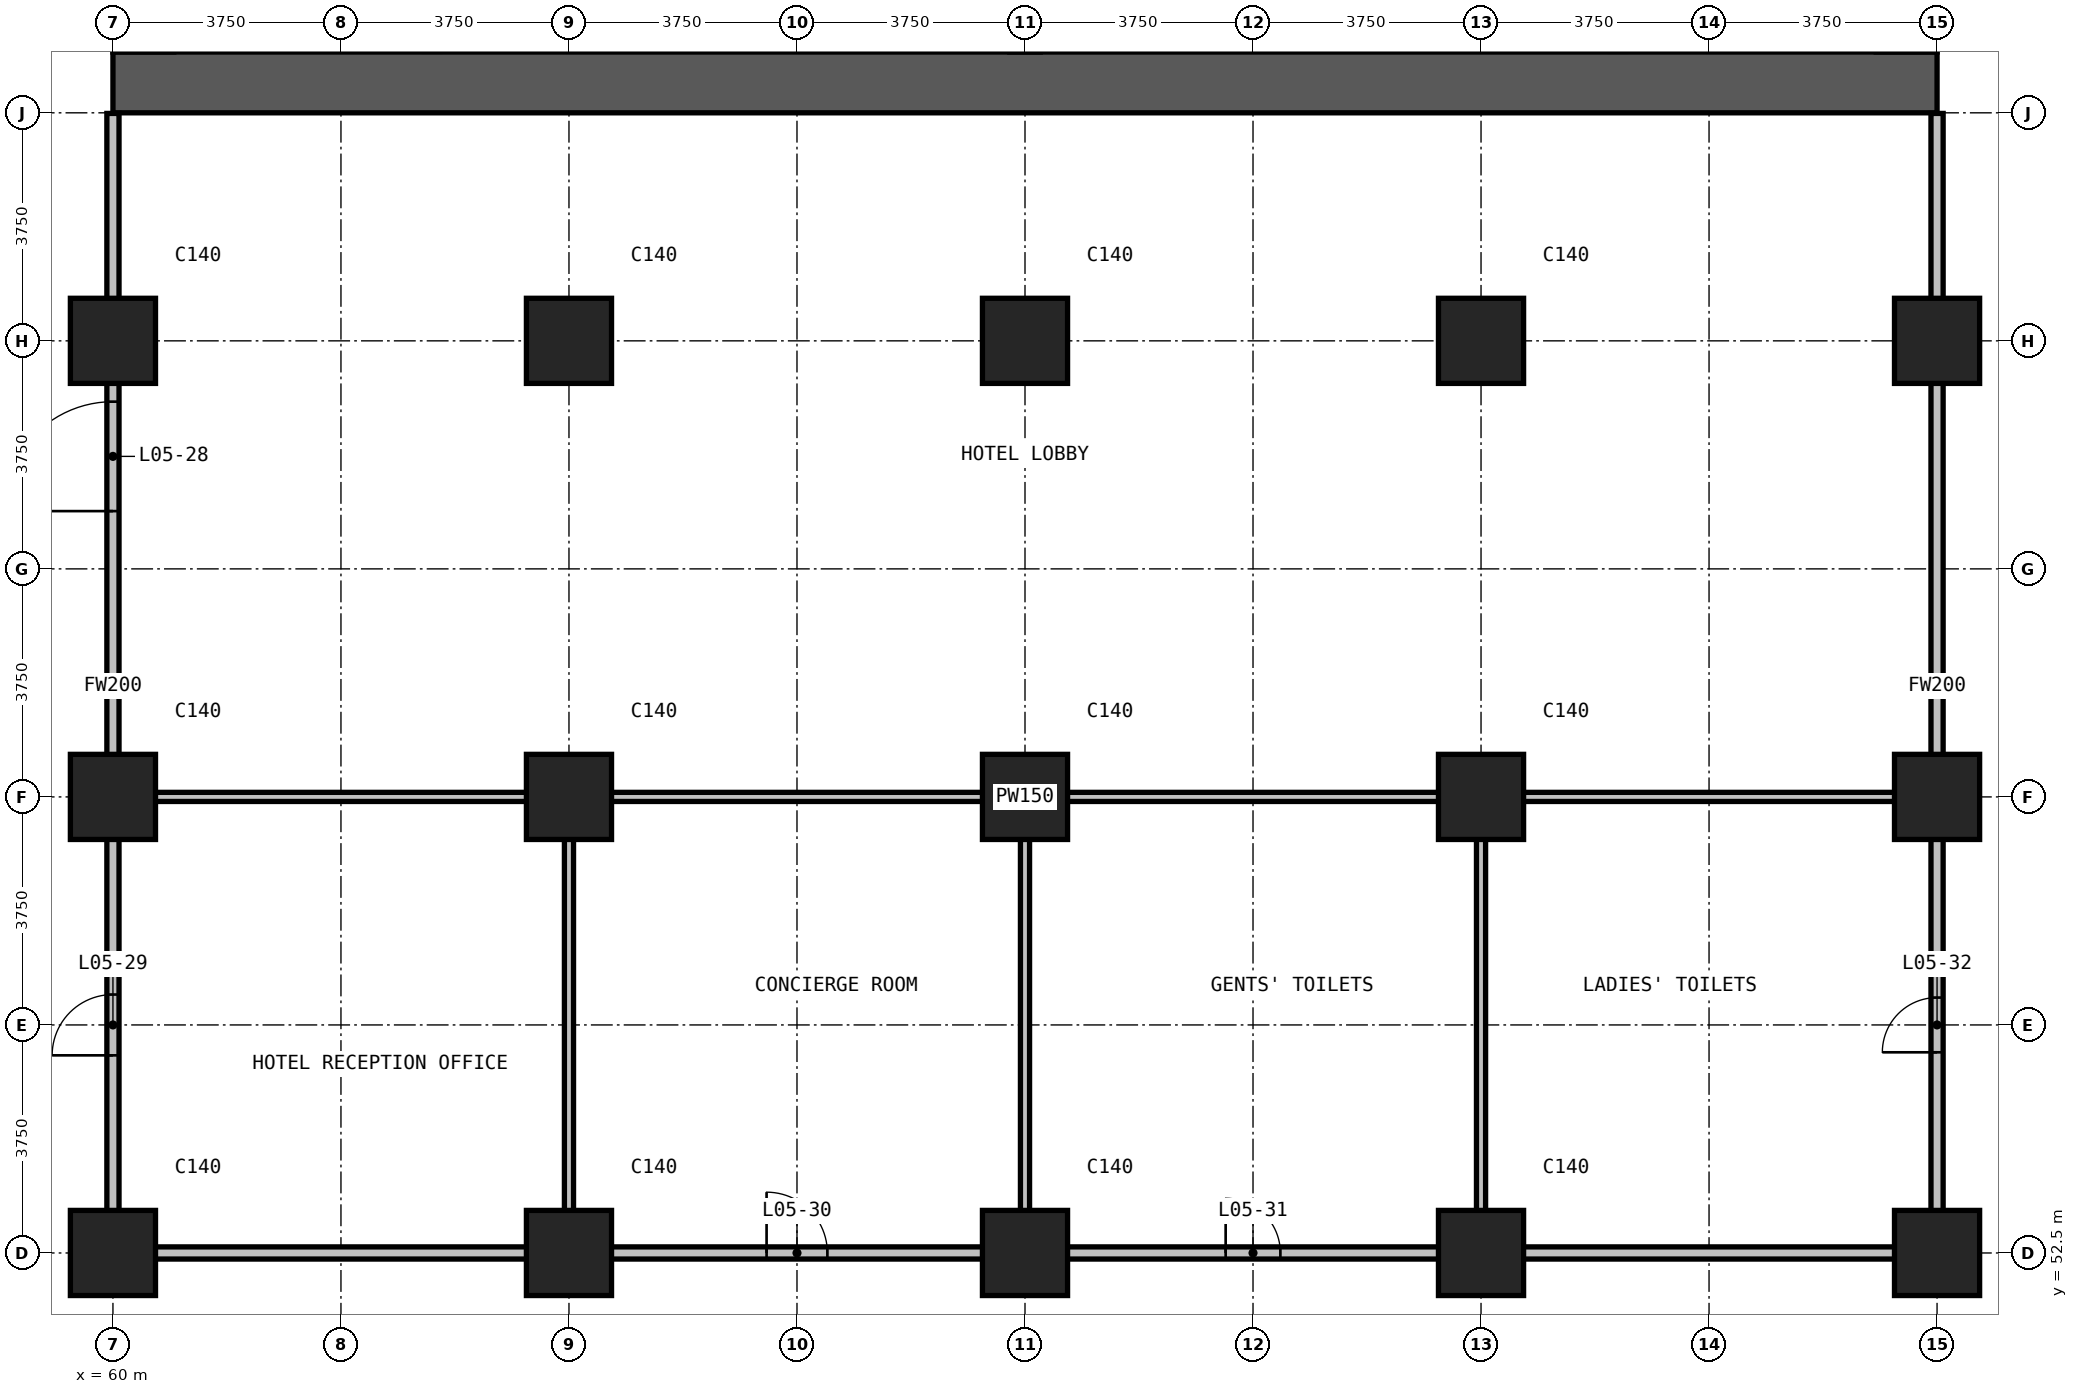
"""IFC4 building model, lengths in metres.
Left out: names, types, materials, properties, quantities, classifications, styles, units other than length and angle.
Written with IfcOpenShell. Run it as: python <this file> out.ifc"""

import sys

from ifc_helpers import new_model, si_unit, direction, frame, frame_2d, origin, origin_2d, place, context, subcontext, project, spatial, rectangle, extrude, element, fill, save


model = new_model("IFC4")
c1 = context("Model", 3, precision=1e-05, world=origin(), true_north=direction((0.0, 1.0)))
c2 = subcontext(c1, "Body", "Model", "MODEL_VIEW")
j1 = project(units=[si_unit("LENGTHUNIT", "METRE"), si_unit("PLANEANGLEUNIT", "RADIAN")], contexts=[c1])
p1 = place(None, origin())
s1 = spatial("IfcSite", under=j1, at=p1, CompositionType="ELEMENT")
p2 = place(p1, origin())
s2 = spatial("IfcBuilding", under=s1, at=p2, CompositionType="ELEMENT")
p3 = place(p2, frame((0.0, 0.0, 35.0)))
s3 = spatial("IfcBuildingStorey", under=s2, at=p3, CompositionType="ELEMENT", Elevation=35.0)
for number, where, z_axis, x_axis in (
    (1, (60.0, 52.5, 0.0), (0.0, 0.0, 1.0), (1.0, 0.0, 0.0)),
    (2, (60.0, 60.0, 0.0), (0.0, 0.0, 1.0), (1.0, 0.0, 0.0)),
    (3, (60.0, 67.5, 0.0), (0.0, 0.0, 1.0), (1.0, 0.0, 0.0)),
    (4, (67.5, 52.5, 0.0), (0.0, 0.0, 1.0), (1.0, 0.0, 0.0)),
    (5, (67.5, 60.0, 0.0), (0.0, 0.0, 1.0), (1.0, 0.0, 0.0)),
    (6, (67.5, 67.5, 0.0), (0.0, 0.0, 1.0), (1.0, 0.0, 0.0)),
    (7, (75.0, 52.5, 0.0), (0.0, 0.0, 1.0), (1.0, 0.0, 0.0)),
    (8, (75.0, 60.0, 0.0), (0.0, 0.0, 1.0), (1.0, 0.0, 0.0)),
    (9, (75.0, 67.5, 0.0), (0.0, 0.0, 1.0), (1.0, 0.0, 0.0)),
    (10, (82.5, 52.5, 0.0), (0.0, 0.0, 1.0), (1.0, 0.0, 0.0)),
    (11, (82.5, 60.0, 0.0), (0.0, 0.0, 1.0), (1.0, 0.0, 0.0)),
    (12, (82.5, 67.5, 0.0), (0.0, 0.0, 1.0), (1.0, 0.0, 0.0)),
    (13, (90.0, 52.5, 0.0), (0.0, 0.0, 1.0), (1.0, 0.0, 0.0)),
    (14, (90.0, 60.0, 0.0), (0.0, 0.0, 1.0), (1.0, 0.0, 0.0)),
    (15, (90.0, 67.5, 0.0), (0.0, 0.0, 1.0), (1.0, 0.0, 0.0)),
):
    element("IfcColumn", number, at=place(p3, frame(where, z_axis=z_axis, x_axis=x_axis)), inside=s3, PredefinedType="COLUMN", context=c2, shape_type="SweptSolid", body=[
        extrude(rectangle(XDim=1.4, YDim=1.4, at=origin_2d()), origin(), (0.0, 0.0, 1.0), 4.5),
    ])
p4 = place(p3, frame((60.0, 71.75, 0.0), z_axis=(0.0, 0.0, 1.0), x_axis=(1.0, 0.0, 0.0)))
e16 = element("IfcWall", 16, at=p4, inside=s3, PredefinedType="SHEAR", context=c2, shape_type="SweptSolid", body=[
    extrude(rectangle(XDim=30.0, YDim=1.0, at=frame_2d((15.0, 0.0))), origin(), (0.0, 0.0, 1.0), 4.5),
])
p5 = place(p3, frame((60.1, 52.5, 0.0), z_axis=(0.0, 0.0, 1.0), x_axis=(1.0, 0.0, 0.0)))
e17 = element("IfcWall", 17, at=p5, inside=s3, PredefinedType="PARTITIONING", context=c2, shape_type="SweptSolid", body=[
    extrude(rectangle(XDim=29.8, YDim=0.2, at=frame_2d((14.9, 0.0))), origin(), (0.0, 0.0, 1.0), 4.2),
])
p6 = place(p5, frame((10.65, 0.0, 0.0)))
e18 = element("IfcOpeningElement", 18, at=p6, cuts=e17, PredefinedType="OPENING", context=c2, shape_type="SweptSolid", body=[
    extrude(rectangle(XDim=1.0, YDim=2.2, at=frame_2d((0.5, 1.1))), frame((0.0, 0.11, 0.0), z_axis=(0.0, -1.0, 0.0), x_axis=(1.0, 0.0, 0.0)), (0.0, 0.0, 1.0), 0.22),
])
p7 = place(p5, frame((18.2, 0.0, 0.0)))
e19 = element("IfcOpeningElement", 19, at=p7, cuts=e17, PredefinedType="OPENING", context=c2, shape_type="SweptSolid", body=[
    extrude(rectangle(XDim=0.9, YDim=2.2, at=frame_2d((0.45, 1.1))), frame((0.0, 0.11, 0.0), z_axis=(0.0, -1.0, 0.0), x_axis=(1.0, 0.0, 0.0)), (0.0, 0.0, 1.0), 0.22),
])
p8 = place(p3, frame((60.0, 52.4, 0.0), z_axis=(0.0, 0.0, 1.0), x_axis=(0.0, 1.0, 0.0)))
e20 = element("IfcWall", 20, at=p8, inside=s3, PredefinedType="PARTITIONING", context=c2, shape_type="SweptSolid", body=[
    extrude(rectangle(XDim=18.84, YDim=0.2, at=frame_2d((9.42, 0.0))), origin(), (0.0, 0.0, 1.0), 4.2),
])
p9 = place(p8, frame((12.3, 0.0, 0.0)))
e21 = element("IfcOpeningElement", 21, at=p9, cuts=e20, PredefinedType="OPENING", context=c2, shape_type="SweptSolid", body=[
    extrude(rectangle(XDim=1.8, YDim=2.2, at=frame_2d((0.9, 1.1))), frame((0.0, 0.11, 0.0), z_axis=(0.0, -1.0, 0.0), x_axis=(1.0, 0.0, 0.0)), (0.0, 0.0, 1.0), 0.22),
])
p10 = place(p8, frame((3.35, 0.0, 0.0)))
e22 = element("IfcOpeningElement", 22, at=p10, cuts=e20, PredefinedType="OPENING", context=c2, shape_type="SweptSolid", body=[
    extrude(rectangle(XDim=1.0, YDim=2.2, at=frame_2d((0.5, 1.1))), frame((0.0, 0.11, 0.0), z_axis=(0.0, -1.0, 0.0), x_axis=(1.0, 0.0, 0.0)), (0.0, 0.0, 1.0), 0.22),
])
p11 = place(p3, frame((90.0, 52.4, 0.0), z_axis=(0.0, 0.0, 1.0), x_axis=(0.0, 1.0, 0.0)))
e23 = element("IfcWall", 23, at=p11, inside=s3, PredefinedType="PARTITIONING", context=c2, shape_type="SweptSolid", body=[
    extrude(rectangle(XDim=18.84, YDim=0.2, at=frame_2d((9.42, 0.0))), origin(), (0.0, 0.0, 1.0), 4.2),
])
p12 = place(p11, frame((3.4, 0.0, 0.0)))
e24 = element("IfcOpeningElement", 24, at=p12, cuts=e23, PredefinedType="OPENING", context=c2, shape_type="SweptSolid", body=[
    extrude(rectangle(XDim=0.9, YDim=2.2, at=frame_2d((0.45, 1.1))), frame((0.0, 0.11, 0.0), z_axis=(0.0, -1.0, 0.0), x_axis=(1.0, 0.0, 0.0)), (0.0, 0.0, 1.0), 0.22),
])
p13 = place(p3, frame((60.1, 60.0, 0.0), z_axis=(0.0, 0.0, 1.0), x_axis=(1.0, 0.0, 0.0)))
e25 = element("IfcWall", 25, at=p13, inside=s3, PredefinedType="PARTITIONING", context=c2, shape_type="SweptSolid", body=[
    extrude(rectangle(XDim=29.8, YDim=0.15, at=frame_2d((14.9, 0.0))), origin(), (0.0, 0.0, 1.0), 4.2),
])
for number, where, z_axis, x_axis in (
    (26, (67.5, 52.6, 0.0), (0.0, 0.0, 1.0), (0.0, 1.0, 0.0)),
    (27, (75.0, 52.6, 0.0), (0.0, 0.0, 1.0), (0.0, 1.0, 0.0)),
    (28, (82.5, 52.6, 0.0), (0.0, 0.0, 1.0), (0.0, 1.0, 0.0)),
):
    element("IfcWall", number, at=place(p3, frame(where, z_axis=z_axis, x_axis=x_axis)), inside=s3, PredefinedType="PARTITIONING", context=c2, shape_type="SweptSolid", body=[
        extrude(rectangle(XDim=7.325, YDim=0.15, at=frame_2d((3.663, 0.0))), origin(), (0.0, 0.0, 1.0), 4.2),
    ])
p14 = place(p9, origin())
e29 = element("IfcDoor", 29, at=p14, inside=s3, OperationType="DOUBLE_DOOR_SINGLE_SWING", PredefinedType="DOOR", context=c2, shape_type="SweptSolid", body=[
    extrude(rectangle(XDim=1.8, YDim=2.2, at=frame_2d((0.9, 1.1))), frame((0.0, 0.025, 0.0), z_axis=(0.0, -1.0, 0.0), x_axis=(1.0, 0.0, 0.0)), (0.0, 0.0, 1.0), 0.05),
])
fill(e21, e29)
p15 = place(p10, origin())
e30 = element("IfcDoor", 30, at=p15, inside=s3, OperationType="SINGLE_SWING_LEFT", PredefinedType="DOOR", context=c2, shape_type="SweptSolid", body=[
    extrude(rectangle(XDim=1.0, YDim=2.2, at=frame_2d((0.5, 1.1))), frame((0.0, 0.025, 0.0), z_axis=(0.0, -1.0, 0.0), x_axis=(1.0, 0.0, 0.0)), (0.0, 0.0, 1.0), 0.05),
])
fill(e22, e30)
p16 = place(p6, origin())
e31 = element("IfcDoor", 31, at=p16, inside=s3, OperationType="SINGLE_SWING_RIGHT", PredefinedType="DOOR", context=c2, shape_type="SweptSolid", body=[
    extrude(rectangle(XDim=1.0, YDim=2.2, at=frame_2d((0.5, 1.1))), frame((0.0, 0.025, 0.0), z_axis=(0.0, -1.0, 0.0), x_axis=(1.0, 0.0, 0.0)), (0.0, 0.0, 1.0), 0.05),
])
fill(e18, e31)
p17 = place(p7, origin())
e32 = element("IfcDoor", 32, at=p17, inside=s3, OperationType="SINGLE_SWING_LEFT", PredefinedType="DOOR", context=c2, shape_type="SweptSolid", body=[
    extrude(rectangle(XDim=0.9, YDim=2.2, at=frame_2d((0.45, 1.1))), frame((0.0, 0.025, 0.0), z_axis=(0.0, -1.0, 0.0), x_axis=(1.0, 0.0, 0.0)), (0.0, 0.0, 1.0), 0.05),
])
fill(e19, e32)
p18 = place(p12, origin())
e33 = element("IfcDoor", 33, at=p18, inside=s3, OperationType="SINGLE_SWING_RIGHT", PredefinedType="DOOR", context=c2, shape_type="SweptSolid", body=[
    extrude(rectangle(XDim=0.9, YDim=2.2, at=frame_2d((0.45, 1.1))), frame((0.0, 0.025, 0.0), z_axis=(0.0, -1.0, 0.0), x_axis=(1.0, 0.0, 0.0)), (0.0, 0.0, 1.0), 0.05),
])
fill(e24, e33)
save(model, sys.argv[1])
